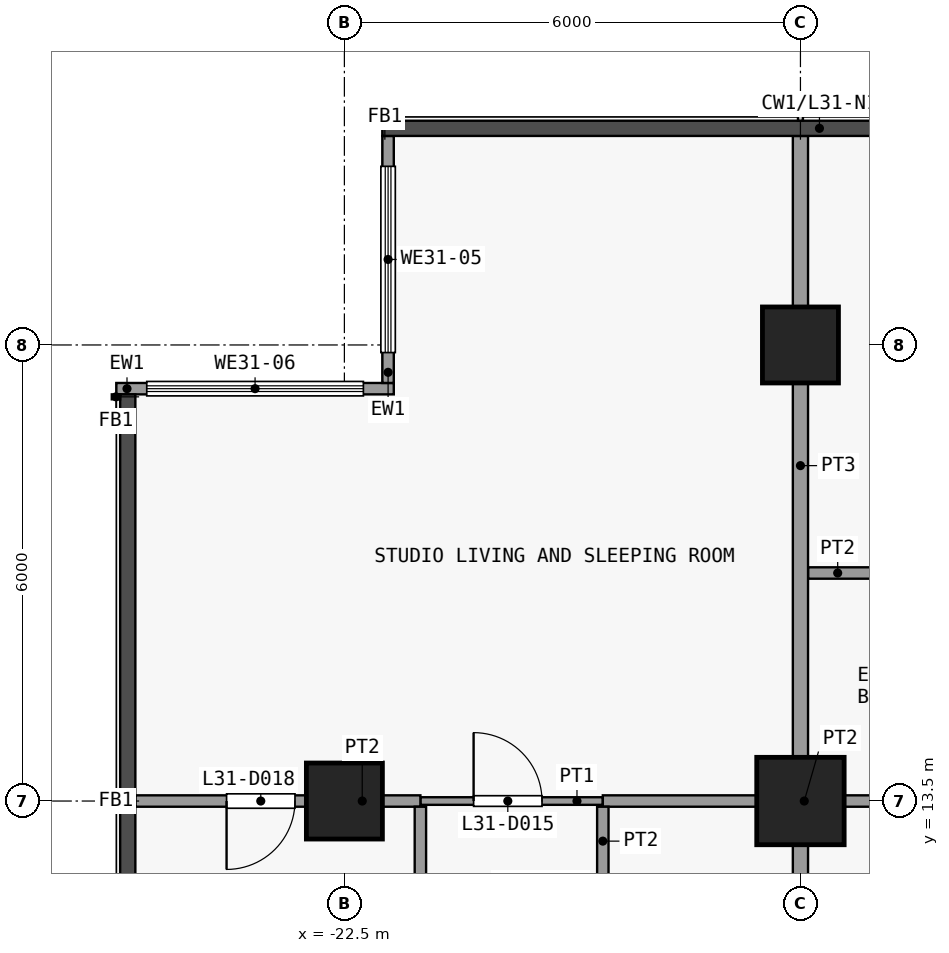
"""IFC4 building model, lengths in metres.
Left out: names, types, materials, properties, quantities, classifications, styles, units other than length and angle.
Written with IfcOpenShell. Run it as: python <this file> out.ifc"""

import sys

from ifc_helpers import new_model, si_unit, direction, frame, frame_2d, origin, origin_2d, place, context, subcontext, project, spatial, rectangle, extrude, element, fill, save


model = new_model("IFC4")
c1 = context("Model", 3, precision=1e-05, world=origin(), true_north=direction((0.0, 1.0)))
c2 = subcontext(c1, "Body", "Model", "MODEL_VIEW")
j1 = project(units=[si_unit("LENGTHUNIT", "METRE"), si_unit("PLANEANGLEUNIT", "RADIAN")], contexts=[c1])
p1 = place(None, origin())
s1 = spatial("IfcSite", under=j1, at=p1, CompositionType="ELEMENT")
p2 = place(p1, origin())
s2 = spatial("IfcBuilding", under=s1, at=p2, CompositionType="ELEMENT")
p3 = place(p2, frame((0.0, 0.0, 124.3)))
s3 = spatial("IfcBuildingStorey", under=s2, at=p3, CompositionType="ELEMENT", Elevation=124.3)
p4 = place(p3, frame((-22.5, 13.5, 0.0), z_axis=(0.0, 0.0, 1.0), x_axis=(1.0, 0.0, 0.0)))
e1 = element("IfcColumn", 1, at=p4, inside=s3, PredefinedType="COLUMN", context=c2, shape_type="SweptSolid", body=[
    extrude(rectangle(XDim=1.0, YDim=1.0, at=origin_2d()), origin(), (0.0, 0.0, 1.0), 3.6),
])
p5 = place(p3, frame((-16.5, 13.5, 0.0), z_axis=(0.0, 0.0, 1.0), x_axis=(1.0, 0.0, 0.0)))
e2 = element("IfcColumn", 2, at=p5, inside=s3, PredefinedType="COLUMN", context=c2, shape_type="SweptSolid", body=[
    extrude(rectangle(XDim=1.15, YDim=1.15, at=origin_2d()), origin(), (0.0, 0.0, 1.0), 3.6),
])
p6 = place(p3, frame((-16.5, 19.5, 0.0), z_axis=(0.0, 0.0, 1.0), x_axis=(1.0, 0.0, 0.0)))
e3 = element("IfcColumn", 3, at=p6, inside=s3, PredefinedType="COLUMN", context=c2, shape_type="SweptSolid", body=[
    extrude(rectangle(XDim=1.0, YDim=1.0, at=origin_2d()), origin(), (0.0, 0.0, 1.0), 3.6),
])
p7 = place(p3, frame((-21.925, 19.0, 0.0), z_axis=(0.0, 0.0, 1.0), x_axis=(0.0, 1.0, 0.0)))
e4 = element("IfcWall", 4, at=p7, inside=s3, PredefinedType="SOLIDWALL", context=c2, shape_type="SweptSolid", body=[
    extrude(rectangle(XDim=3.25, YDim=0.15, at=frame_2d((1.625, 0.0))), origin(), (0.0, 0.0, 1.0), 3.3),
])
p8 = place(p7, frame((0.4, 0.0, 0.9)))
e5 = element("IfcOpeningElement", 5, at=p8, cuts=e4, PredefinedType="OPENING", context=c2, shape_type="SweptSolid", body=[
    extrude(rectangle(XDim=2.45, YDim=2.4, at=frame_2d((1.225, 1.2))), frame((0.0, 0.085, 0.0), z_axis=(0.0, -1.0, 0.0), x_axis=(1.0, 0.0, 0.0)), (0.0, 0.0, 1.0), 0.17),
])
p9 = place(p3, frame((-25.5, 18.925, 0.0), z_axis=(0.0, 0.0, 1.0), x_axis=(1.0, 0.0, 0.0)))
e6 = element("IfcWall", 6, at=p9, inside=s3, PredefinedType="SOLIDWALL", context=c2, shape_type="SweptSolid", body=[
    extrude(rectangle(XDim=3.65, YDim=0.15, at=frame_2d((1.825, 0.0))), origin(), (0.0, 0.0, 1.0), 3.3),
])
p10 = place(p9, frame((0.4, 0.0, 0.9)))
e7 = element("IfcOpeningElement", 7, at=p10, cuts=e6, PredefinedType="OPENING", context=c2, shape_type="SweptSolid", body=[
    extrude(rectangle(XDim=2.85, YDim=2.4, at=frame_2d((1.425, 1.2))), frame((0.0, 0.085, 0.0), z_axis=(0.0, -1.0, 0.0), x_axis=(1.0, 0.0, 0.0)), (0.0, 0.0, 1.0), 0.17),
])
p11 = place(p3, frame((-21.5, 13.5, 0.0), z_axis=(0.0, 0.0, 1.0), x_axis=(1.0, 0.0, 0.0)))
e8 = element("IfcWall", 8, at=p11, inside=s3, PredefinedType="PARTITIONING", context=c2, shape_type="SweptSolid", body=[
    extrude(rectangle(XDim=2.4, YDim=0.1, at=frame_2d((1.2, 0.0))), origin(), (0.0, 0.0, 1.0), 3.3),
])
p12 = place(p11, frame((0.7, 0.0, 0.0)))
e9 = element("IfcOpeningElement", 9, at=p12, cuts=e8, PredefinedType="OPENING", context=c2, shape_type="SweptSolid", body=[
    extrude(rectangle(XDim=0.9, YDim=2.1, at=frame_2d((0.45, 1.05))), frame((0.0, 0.06, 0.0), z_axis=(0.0, -1.0, 0.0), x_axis=(1.0, 0.0, 0.0)), (0.0, 0.0, 1.0), 0.12),
])
p13 = place(p3, frame((-25.25, 13.5, 0.0), z_axis=(0.0, 0.0, 1.0), x_axis=(1.0, 0.0, 0.0)))
e10 = element("IfcWall", 10, at=p13, inside=s3, PredefinedType="PARTITIONING", context=c2, shape_type="SweptSolid", body=[
    extrude(rectangle(XDim=3.75, YDim=0.15, at=frame_2d((1.875, 0.0))), origin(), (0.0, 0.0, 1.0), 3.3),
])
p14 = place(p13, frame((1.2, 0.0, 0.0)))
e11 = element("IfcOpeningElement", 11, at=p14, cuts=e10, PredefinedType="OPENING", context=c2, shape_type="SweptSolid", body=[
    extrude(rectangle(XDim=0.9, YDim=2.1, at=frame_2d((0.45, 1.05))), frame((0.0, 0.085, 0.0), z_axis=(0.0, -1.0, 0.0), x_axis=(1.0, 0.0, 0.0)), (0.0, 0.0, 1.0), 0.17),
])
p15 = place(p3, frame((-19.1, 13.5, 0.0), z_axis=(0.0, 0.0, 1.0), x_axis=(1.0, 0.0, 0.0)))
e12 = element("IfcWall", 12, at=p15, inside=s3, PredefinedType="PARTITIONING", context=c2, shape_type="SweptSolid", body=[
    extrude(rectangle(XDim=5.3, YDim=0.15, at=frame_2d((2.65, 0.0))), origin(), (0.0, 0.0, 1.0), 3.3),
])
p16 = place(p3, frame((-16.4, 16.5, 0.0), z_axis=(0.0, 0.0, 1.0), x_axis=(1.0, 0.0, 0.0)))
e13 = element("IfcWall", 13, at=p16, inside=s3, PredefinedType="PARTITIONING", context=c2, shape_type="SweptSolid", body=[
    extrude(rectangle(XDim=2.6, YDim=0.15, at=frame_2d((1.3, 0.0))), origin(), (0.0, 0.0, 1.0), 3.3),
])
p17 = place(p16, frame((0.9, 0.0, 0.0)))
e14 = element("IfcOpeningElement", 14, at=p17, cuts=e13, PredefinedType="OPENING", context=c2, shape_type="SweptSolid", body=[
    extrude(rectangle(XDim=0.9, YDim=2.1, at=frame_2d((0.45, 1.05))), frame((0.0, 0.085, 0.0), z_axis=(0.0, -1.0, 0.0), x_axis=(1.0, 0.0, 0.0)), (0.0, 0.0, 1.0), 0.17),
])
p18 = place(p3, frame((-21.5, 10.6, 0.0), z_axis=(0.0, 0.0, 1.0), x_axis=(0.0, 1.0, 0.0)))
e15 = element("IfcWall", 15, at=p18, inside=s3, PredefinedType="PARTITIONING", context=c2, shape_type="SweptSolid", body=[
    extrude(rectangle(XDim=2.825, YDim=0.15, at=frame_2d((1.413, 0.0))), origin(), (0.0, 0.0, 1.0), 3.3),
])
p19 = place(p3, frame((-19.1, 10.6, 0.0), z_axis=(0.0, 0.0, 1.0), x_axis=(0.0, 1.0, 0.0)))
e16 = element("IfcWall", 16, at=p19, inside=s3, PredefinedType="PARTITIONING", context=c2, shape_type="SweptSolid", body=[
    extrude(rectangle(XDim=2.825, YDim=0.15, at=frame_2d((1.413, 0.0))), origin(), (0.0, 0.0, 1.0), 3.3),
])
p20 = place(p19, frame((0.9, 0.0, 0.0)))
e17 = element("IfcOpeningElement", 17, at=p20, cuts=e16, PredefinedType="OPENING", context=c2, shape_type="SweptSolid", body=[
    extrude(rectangle(XDim=0.9, YDim=2.1, at=frame_2d((0.45, 1.05))), frame((0.0, 0.085, 0.0), z_axis=(0.0, -1.0, 0.0), x_axis=(1.0, 0.0, 0.0)), (0.0, 0.0, 1.0), 0.17),
])
p21 = place(p3, frame((-16.5, 10.6, 0.0), z_axis=(0.0, 0.0, 1.0), x_axis=(0.0, 1.0, 0.0)))
e18 = element("IfcWall", 18, at=p21, inside=s3, PredefinedType="PARTITIONING", context=c2, shape_type="SweptSolid", body=[
    extrude(rectangle(XDim=2.825, YDim=0.2, at=frame_2d((1.413, 0.0))), origin(), (0.0, 0.0, 1.0), 3.3),
])
p22 = place(p3, frame((-16.5, 13.575, 0.0), z_axis=(0.0, 0.0, 1.0), x_axis=(0.0, 1.0, 0.0)))
e19 = element("IfcWall", 19, at=p22, inside=s3, PredefinedType="PARTITIONING", context=c2, shape_type="SweptSolid", body=[
    extrude(rectangle(XDim=8.675, YDim=0.2, at=frame_2d((4.337, 0.0))), origin(), (0.0, 0.0, 1.0), 3.3),
])
p23 = place(p8, origin())
e20 = element("IfcWindow", 20, at=p23, inside=s3, PartitioningType="SINGLE_PANEL", PredefinedType="WINDOW", context=c2, shape_type="SweptSolid", body=[
    extrude(rectangle(XDim=2.45, YDim=2.4, at=frame_2d((1.225, 1.2))), frame((0.0, 0.03, 0.0), z_axis=(0.0, -1.0, 0.0), x_axis=(1.0, 0.0, 0.0)), (0.0, 0.0, 1.0), 0.06),
])
fill(e5, e20)
p24 = place(p10, origin())
e21 = element("IfcWindow", 21, at=p24, inside=s3, PartitioningType="SINGLE_PANEL", PredefinedType="WINDOW", context=c2, shape_type="SweptSolid", body=[
    extrude(rectangle(XDim=2.85, YDim=2.4, at=frame_2d((1.425, 1.2))), frame((0.0, 0.03, 0.0), z_axis=(0.0, -1.0, 0.0), x_axis=(1.0, 0.0, 0.0)), (0.0, 0.0, 1.0), 0.06),
])
fill(e7, e21)
p25 = place(p12, origin())
e22 = element("IfcDoor", 22, at=p25, inside=s3, OperationType="SINGLE_SWING_RIGHT", PredefinedType="DOOR", context=c2, shape_type="SweptSolid", body=[
    extrude(rectangle(XDim=0.9, YDim=2.1, at=frame_2d((0.45, 1.05))), frame((0.0, 0.025, 0.0), z_axis=(0.0, -1.0, 0.0), x_axis=(1.0, 0.0, 0.0)), (0.0, 0.0, 1.0), 0.05),
])
fill(e9, e22)
p26 = place(p14, origin())
e23 = element("IfcDoor", 23, at=p26, inside=s3, OperationType="SINGLE_SWING_LEFT", PredefinedType="DOOR", context=c2, shape_type="SweptSolid", body=[
    extrude(rectangle(XDim=0.9, YDim=2.1, at=frame_2d((0.45, 1.05))), frame((0.0, 0.025, 0.0), z_axis=(0.0, -1.0, 0.0), x_axis=(1.0, 0.0, 0.0)), (0.0, 0.0, 1.0), 0.05),
])
fill(e11, e23)
save(model, sys.argv[1])
